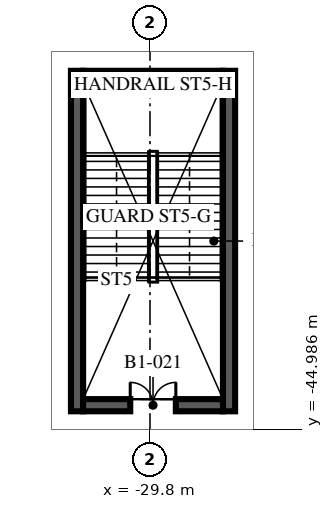
"""IFC4 building model, lengths in metres.
Left out: names, types, materials, properties, quantities, classifications, styles, units other than length and angle.
Written with IfcOpenShell. Run it as: python <this file> out.ifc"""

import sys

from ifc_helpers import new_model, si_unit, direction, frame, frame_2d, origin, place, context, subcontext, project, spatial, rectangle, extrude, element, fill, save


model = new_model("IFC4")
c1 = context("Model", 3, precision=1e-05, world=origin(), true_north=direction((0.0, 1.0)))
c2 = subcontext(c1, "Body", "Model", "MODEL_VIEW")
j1 = project(units=[si_unit("LENGTHUNIT", "METRE"), si_unit("PLANEANGLEUNIT", "RADIAN")], contexts=[c1])
p1 = place(None, origin())
s1 = spatial("IfcSite", under=j1, at=p1, CompositionType="ELEMENT")
p2 = place(p1, origin())
s2 = spatial("IfcBuilding", under=s1, at=p2, CompositionType="ELEMENT")
p3 = place(p2, frame((0.0, 0.0, -5.4)))
s3 = spatial("IfcBuildingStorey", under=s2, at=p3, CompositionType="ELEMENT", Elevation=-5.4)
for number, where, z_axis, x_axis in (
    (1, (-32.2, -44.4, -0.3), (0.0, 0.0, 1.0), (0.0, 1.0, 0.0)),
    (2, (-27.2, -44.4, -0.3), (0.0, 0.0, 1.0), (0.0, 1.0, 0.0)),
):
    element("IfcWall", number, at=place(p3, frame(where, z_axis=z_axis, x_axis=x_axis)), inside=s3, PredefinedType="SOLIDWALL", context=c2, shape_type="SweptSolid", body=[
        extrude(rectangle(XDim=11.2, YDim=0.4, at=frame_2d((5.6, 0.0))), origin(), (0.0, 0.0, 1.0), 5.1),
    ])
p4 = place(p3, frame((-32.0, -44.2, -0.3), z_axis=(0.0, 0.0, 1.0), x_axis=(1.0, 0.0, 0.0)))
e3 = element("IfcWall", 3, at=p4, inside=s3, PredefinedType="SOLIDWALL", context=c2, shape_type="SweptSolid", body=[
    extrude(rectangle(XDim=4.6, YDim=0.4, at=frame_2d((2.3, 0.0))), origin(), (0.0, 0.0, 1.0), 5.1),
])
p5 = place(p4, frame((1.55, 0.0, 0.3)))
e4 = element("IfcOpeningElement", 4, at=p5, cuts=e3, PredefinedType="OPENING", context=c2, shape_type="SweptSolid", body=[
    extrude(rectangle(XDim=1.5, YDim=2.1, at=frame_2d((0.75, 1.05))), frame((0.0, 0.21, 0.0), z_axis=(0.0, -1.0, 0.0), x_axis=(1.0, 0.0, 0.0)), (0.0, 0.0, 1.0), 0.42),
])
p6 = place(p3, frame((-32.0, -33.4, -0.3), z_axis=(0.0, 0.0, 1.0), x_axis=(1.0, 0.0, 0.0)))
e5 = element("IfcWall", 5, at=p6, inside=s3, PredefinedType="SOLIDWALL", context=c2, shape_type="SweptSolid", body=[
    extrude(rectangle(XDim=4.6, YDim=0.4, at=frame_2d((2.3, 0.0))), origin(), (0.0, 0.0, 1.0), 5.1),
])
p7 = place(p5, origin())
e6 = element("IfcDoor", 6, at=p7, inside=s3, OperationType="DOUBLE_DOOR_SINGLE_SWING", PredefinedType="DOOR", context=c2, shape_type="SweptSolid", body=[
    extrude(rectangle(XDim=1.5, YDim=2.1, at=frame_2d((0.75, 1.05))), frame((0.0, 0.025, 0.0), z_axis=(0.0, -1.0, 0.0), x_axis=(1.0, 0.0, 0.0)), (0.0, 0.0, 1.0), 0.05),
])
fill(e4, e6)
save(model, sys.argv[1])
